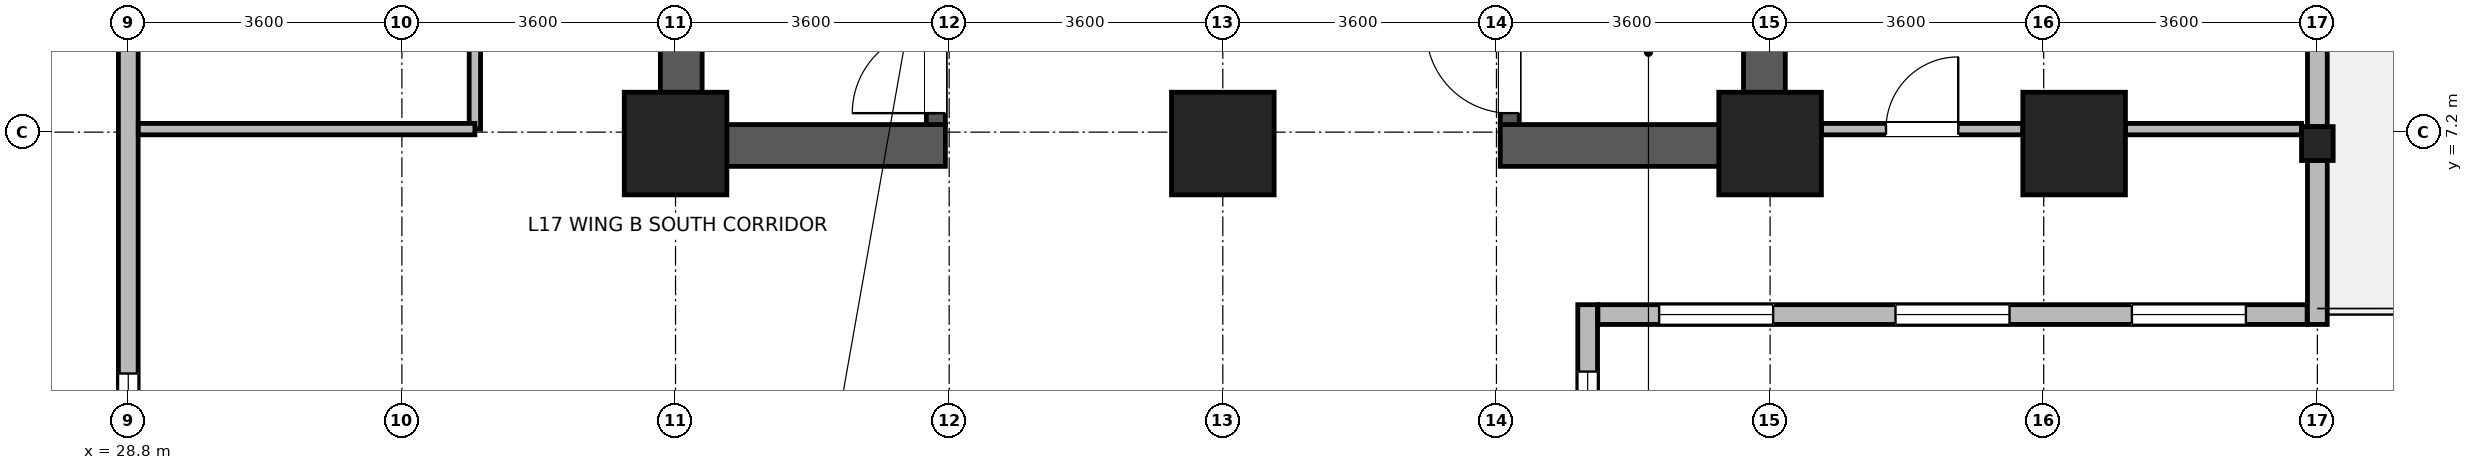
"""IFC4 building model, lengths in metres.
Left out: names, types, materials, properties, quantities, classifications, styles, units other than length and angle.
Written with IfcOpenShell. Run it as: python <this file> out.ifc"""

import sys

from ifc_helpers import new_model, si_unit, direction, frame, frame_2d, origin, origin_2d, place, context, subcontext, project, spatial, rectangle, i_section, extrude, source, transform, mapped, element, fill, save


model = new_model("IFC4")
c1 = context("Model", 3, precision=1e-05, world=origin(), true_north=direction((0.0, 1.0)))
c2 = subcontext(c1, "Body", "Model", "MODEL_VIEW")
j1 = project(units=[si_unit("LENGTHUNIT", "METRE"), si_unit("PLANEANGLEUNIT", "RADIAN")], contexts=[c1])
p1 = place(None, origin())
s1 = spatial("IfcSite", under=j1, at=p1, CompositionType="ELEMENT")
p2 = place(p1, origin())
s2 = spatial("IfcBuilding", under=s1, at=p2, CompositionType="ELEMENT")
p3 = place(p2, frame((0.0, 0.0, 69.7)))
s3 = spatial("IfcBuildingStorey", under=s2, at=p3, CompositionType="ELEMENT", Elevation=69.7)
for number, where, z_axis, x_axis in (
    (1, (36.075, 6.75, 0.0), (0.0, 0.0, 1.0), (0.0, 1.0, 0.0)),
    (2, (50.325, 6.75, 0.0), (0.0, 0.0, 1.0), (0.0, 1.0, 0.0)),
):
    element("IfcWall", number, at=place(p3, frame(where, z_axis=z_axis, x_axis=x_axis)), inside=s3, PredefinedType="SHEAR", context=c2, shape_type="SweptSolid", body=[
        extrude(rectangle(XDim=8.1, YDim=0.55, at=frame_2d((4.05, 0.0))), origin(), (0.0, 0.0, 1.0), 3.34),
    ])
for number, where, z_axis, x_axis in (
    (3, (36.35, 7.025, 0.0), (0.0, 0.0, 1.0), (1.0, 0.0, 0.0)),
    (4, (46.85, 7.025, 0.0), (0.0, 0.0, 1.0), (1.0, 0.0, 0.0)),
):
    element("IfcWall", number, at=place(p3, frame(where, z_axis=z_axis, x_axis=x_axis)), inside=s3, PredefinedType="SHEAR", context=c2, shape_type="SweptSolid", body=[
        extrude(rectangle(XDim=3.2, YDim=0.55, at=frame_2d((1.6, 0.0))), origin(), (0.0, 0.0, 1.0), 3.34),
    ])
p4 = place(p3, frame((39.425, 7.3, 0.0), z_axis=(0.0, 0.0, 1.0), x_axis=(0.0, 1.0, 0.0)))
e5 = element("IfcWall", 5, at=p4, inside=s3, PredefinedType="SHEAR", context=c2, shape_type="SweptSolid", body=[
    extrude(rectangle(XDim=7.0, YDim=0.25, at=frame_2d((3.5, 0.0))), origin(), (0.0, 0.0, 1.0), 3.34),
])
p5 = place(p4, frame((0.15, 0.0, 0.0)))
e6 = element("IfcOpeningElement", 6, at=p5, cuts=e5, PredefinedType="OPENING", context=c2, shape_type="SweptSolid", body=[
    extrude(rectangle(XDim=1.1, YDim=2.08, at=frame_2d((0.55, 1.04))), frame((0.0, 0.135, 0.0), z_axis=(0.0, -1.0, 0.0), x_axis=(1.0, 0.0, 0.0)), (0.0, 0.0, 1.0), 0.27),
])
p6 = place(p3, frame((46.975, 7.3, 0.0), z_axis=(0.0, 0.0, 1.0), x_axis=(0.0, 1.0, 0.0)))
e7 = element("IfcWall", 7, at=p6, inside=s3, PredefinedType="SHEAR", context=c2, shape_type="SweptSolid", body=[
    extrude(rectangle(XDim=7.0, YDim=0.25, at=frame_2d((3.5, 0.0))), origin(), (0.0, 0.0, 1.0), 3.34),
])
p7 = place(p6, frame((0.15, 0.0, 0.0)))
e8 = element("IfcOpeningElement", 8, at=p7, cuts=e7, PredefinedType="OPENING", context=c2, shape_type="SweptSolid", body=[
    extrude(rectangle(XDim=1.1, YDim=2.08, at=frame_2d((0.55, 1.04))), frame((0.0, 0.135, 0.0), z_axis=(0.0, -1.0, 0.0), x_axis=(1.0, 0.0, 0.0)), (0.0, 0.0, 1.0), 0.27),
])
m1 = source(origin(), c2, "Body", "SweptSolid", [
    extrude(rectangle(XDim=1.35, YDim=1.35, at=origin_2d()), origin(), (0.0, 0.0, 1.0), 3.7),
])
for number, where, z_axis, x_axis in (
    (9, (36.0, 7.05, 0.0), (0.0, 0.0, 1.0), (1.0, 0.0, 0.0)),
    (10, (43.2, 7.05, 0.0), (0.0, 0.0, 1.0), (1.0, 0.0, 0.0)),
    (11, (50.4, 7.05, 0.0), (0.0, 0.0, 1.0), (1.0, 0.0, 0.0)),
    (12, (54.4, 7.05, 0.0), (0.0, 0.0, 1.0), (1.0, 0.0, 0.0)),
):
    element("IfcColumn", number, at=place(p3, frame(where, z_axis=z_axis, x_axis=x_axis)), inside=s3, PredefinedType="COLUMN", context=c2, shape_type="MappedRepresentation", body=[
        mapped(m1, transform((0.0, 0.0, 0.0), x_axis=(1.0, 0.0, 0.0), y_axis=(0.0, 1.0, 0.0), z_axis=(0.0, 0.0, 1.0), scale=1.0)),
    ])
m2 = source(origin(), c2, "Body", "SweptSolid", [
    extrude(i_section(OverallWidth=0.416, OverallDepth=0.446, WebThickness=0.029, FlangeThickness=0.04, FilletRadius=0.015, at=origin_2d()), origin(), (0.0, 0.0, 1.0), 3.7),
])
p8 = place(p3, frame((57.6, 7.05, 0.0), z_axis=(0.0, 0.0, 1.0), x_axis=(1.0, 0.0, 0.0)))
e13 = element("IfcColumn", 13, at=p8, inside=s3, PredefinedType="COLUMN", context=c2, shape_type="MappedRepresentation", body=[
    mapped(m2, transform((0.0, 0.0, 0.0), x_axis=(1.0, 0.0, 0.0), y_axis=(0.0, 1.0, 0.0), z_axis=(0.0, 0.0, 1.0), scale=1.0)),
])
p9 = place(p3, frame((48.0, 4.93, 0.0), z_axis=(0.0, 0.0, 1.0), x_axis=(0.0, -1.0, 0.0)))
e14 = element("IfcWall", 14, at=p9, inside=s3, PredefinedType="STANDARD", context=c2, shape_type="SweptSolid", body=[
    extrude(rectangle(XDim=3.26, YDim=0.26, at=frame_2d((1.63, 0.0))), origin(), (0.0, 0.0, 1.0), 3.32),
])
p10 = place(p9, frame((0.88, 0.0, 0.85)))
e15 = element("IfcOpeningElement", 15, at=p10, cuts=e14, PredefinedType="OPENING", context=c2, shape_type="SweptSolid", body=[
    extrude(rectangle(XDim=1.5, YDim=1.85, at=frame_2d((0.75, 0.925))), frame((0.0, 0.14, 0.0), z_axis=(0.0, -1.0, 0.0), x_axis=(1.0, 0.0, 0.0)), (0.0, 0.0, 1.0), 0.28),
])
p11 = place(p3, frame((57.465, 4.8, 0.0), z_axis=(0.0, 0.0, 1.0), x_axis=(-1.0, 0.0, 0.0)))
e16 = element("IfcWall", 16, at=p11, inside=s3, PredefinedType="STANDARD", context=c2, shape_type="SweptSolid", body=[
    extrude(rectangle(XDim=9.33, YDim=0.26, at=frame_2d((4.665, 0.0))), origin(), (0.0, 0.0, 1.0), 3.32),
])
p12 = place(p11, frame((0.805, 0.0, 0.85)))
e17 = element("IfcOpeningElement", 17, at=p12, cuts=e16, PredefinedType="OPENING", context=c2, shape_type="SweptSolid", body=[
    extrude(rectangle(XDim=1.5, YDim=1.85, at=frame_2d((0.75, 0.925))), frame((0.0, 0.14, 0.0), z_axis=(0.0, -1.0, 0.0), x_axis=(1.0, 0.0, 0.0)), (0.0, 0.0, 1.0), 0.28),
])
p13 = place(p11, frame((3.915, 0.0, 0.85)))
e18 = element("IfcOpeningElement", 18, at=p13, cuts=e16, PredefinedType="OPENING", context=c2, shape_type="SweptSolid", body=[
    extrude(rectangle(XDim=1.5, YDim=1.85, at=frame_2d((0.75, 0.925))), frame((0.0, 0.14, 0.0), z_axis=(0.0, -1.0, 0.0), x_axis=(1.0, 0.0, 0.0)), (0.0, 0.0, 1.0), 0.28),
])
p14 = place(p11, frame((7.025, 0.0, 0.85)))
e19 = element("IfcOpeningElement", 19, at=p14, cuts=e16, PredefinedType="OPENING", context=c2, shape_type="SweptSolid", body=[
    extrude(rectangle(XDim=1.5, YDim=1.85, at=frame_2d((0.75, 0.925))), frame((0.0, 0.14, 0.0), z_axis=(0.0, -1.0, 0.0), x_axis=(1.0, 0.0, 0.0)), (0.0, 0.0, 1.0), 0.28),
])
p15 = place(p3, frame((57.6, 6.826, 0.0), z_axis=(0.0, 0.0, 1.0), x_axis=(0.0, -1.0, 0.0)))
e20 = element("IfcWall", 20, at=p15, inside=s3, PredefinedType="STANDARD", context=c2, shape_type="SweptSolid", body=[
    extrude(rectangle(XDim=2.156, YDim=0.26, at=frame_2d((1.078, 0.0))), origin(), (0.0, 0.0, 1.0), 3.32),
])
p16 = place(p3, frame((57.6, 14.326, 0.0), z_axis=(0.0, 0.0, 1.0), x_axis=(0.0, -1.0, 0.0)))
e21 = element("IfcWall", 21, at=p16, inside=s3, PredefinedType="STANDARD", context=c2, shape_type="SweptSolid", body=[
    extrude(rectangle(XDim=7.052, YDim=0.26, at=frame_2d((3.526, 0.0))), origin(), (0.0, 0.0, 1.0), 2.82),
])
p17 = place(p16, frame((2.776, 0.0, 0.0)))
e22 = element("IfcOpeningElement", 22, at=p17, cuts=e21, PredefinedType="OPENING", context=c2, shape_type="SweptSolid", body=[
    extrude(rectangle(XDim=1.5, YDim=2.15, at=frame_2d((0.75, 1.075))), frame((0.0, 0.14, 0.0), z_axis=(0.0, -1.0, 0.0), x_axis=(1.0, 0.0, 0.0)), (0.0, 0.0, 1.0), 0.28),
])
p18 = place(p16, frame((1.013, 0.0, 0.85)))
e23 = element("IfcOpeningElement", 23, at=p18, cuts=e21, PredefinedType="OPENING", context=c2, shape_type="SweptSolid", body=[
    extrude(rectangle(XDim=1.5, YDim=1.85, at=frame_2d((0.75, 0.925))), frame((0.0, 0.14, 0.0), z_axis=(0.0, -1.0, 0.0), x_axis=(1.0, 0.0, 0.0)), (0.0, 0.0, 1.0), 0.28),
])
p19 = place(p16, frame((4.539, 0.0, 0.85)))
e24 = element("IfcOpeningElement", 24, at=p19, cuts=e21, PredefinedType="OPENING", context=c2, shape_type="SweptSolid", body=[
    extrude(rectangle(XDim=1.5, YDim=1.85, at=frame_2d((0.75, 0.925))), frame((0.0, 0.14, 0.0), z_axis=(0.0, -1.0, 0.0), x_axis=(1.0, 0.0, 0.0)), (0.0, 0.0, 1.0), 0.28),
])
p20 = place(p3, frame((28.8, 1.67, 0.0), z_axis=(0.0, 0.0, 1.0), x_axis=(0.0, 1.0, 0.0)))
e25 = element("IfcWall", 25, at=p20, inside=s3, PredefinedType="STANDARD", context=c2, shape_type="SweptSolid", body=[
    extrude(rectangle(XDim=19.254, YDim=0.26, at=frame_2d((9.627, 0.0))), origin(), (0.0, 0.0, 1.0), 3.32),
])
p21 = place(p20, frame((0.854, 0.0, 0.85)))
e26 = element("IfcOpeningElement", 26, at=p21, cuts=e25, PredefinedType="OPENING", context=c2, shape_type="SweptSolid", body=[
    extrude(rectangle(XDim=1.5, YDim=1.85, at=frame_2d((0.75, 0.925))), frame((0.0, 0.14, 0.0), z_axis=(0.0, -1.0, 0.0), x_axis=(1.0, 0.0, 0.0)), (0.0, 0.0, 1.0), 0.28),
])
p22 = place(p20, frame((7.272, 0.0, 0.85)))
e27 = element("IfcOpeningElement", 27, at=p22, cuts=e25, PredefinedType="OPENING", context=c2, shape_type="SweptSolid", body=[
    extrude(rectangle(XDim=1.5, YDim=1.85, at=frame_2d((0.75, 0.925))), frame((0.0, 0.14, 0.0), z_axis=(0.0, -1.0, 0.0), x_axis=(1.0, 0.0, 0.0)), (0.0, 0.0, 1.0), 0.28),
])
p23 = place(p20, frame((10.481, 0.0, 0.85)))
e28 = element("IfcOpeningElement", 28, at=p23, cuts=e25, PredefinedType="OPENING", context=c2, shape_type="SweptSolid", body=[
    extrude(rectangle(XDim=1.5, YDim=1.85, at=frame_2d((0.75, 0.925))), frame((0.0, 0.14, 0.0), z_axis=(0.0, -1.0, 0.0), x_axis=(1.0, 0.0, 0.0)), (0.0, 0.0, 1.0), 0.28),
])
p24 = place(p20, frame((13.69, 0.0, 0.85)))
e29 = element("IfcOpeningElement", 29, at=p24, cuts=e25, PredefinedType="OPENING", context=c2, shape_type="SweptSolid", body=[
    extrude(rectangle(XDim=1.5, YDim=1.85, at=frame_2d((0.75, 0.925))), frame((0.0, 0.14, 0.0), z_axis=(0.0, -1.0, 0.0), x_axis=(1.0, 0.0, 0.0)), (0.0, 0.0, 1.0), 0.28),
])
p25 = place(p20, frame((16.899, 0.0, 0.85)))
e30 = element("IfcOpeningElement", 30, at=p25, cuts=e25, PredefinedType="OPENING", context=c2, shape_type="SweptSolid", body=[
    extrude(rectangle(XDim=1.5, YDim=1.85, at=frame_2d((0.75, 0.925))), frame((0.0, 0.14, 0.0), z_axis=(0.0, -1.0, 0.0), x_axis=(1.0, 0.0, 0.0)), (0.0, 0.0, 1.0), 0.28),
])
p26 = place(p3, frame((33.36, 7.24, 0.0), z_axis=(0.0, 0.0, 1.0), x_axis=(0.0, 1.0, 0.0)))
e31 = element("IfcWall", 31, at=p26, inside=s3, PredefinedType="PARTITIONING", context=c2, shape_type="SweptSolid", body=[
    extrude(rectangle(XDim=7.26, YDim=0.15, at=frame_2d((3.63, 0.0))), origin(), (0.0, 0.0, 1.0), 3.32),
])
p27 = place(p26, frame((2.98, 0.0, 0.0)))
e32 = element("IfcOpeningElement", 32, at=p27, cuts=e31, PredefinedType="OPENING", context=c2, shape_type="SweptSolid", body=[
    extrude(rectangle(XDim=1.3, YDim=2.12, at=frame_2d((0.65, 1.06))), frame((0.0, 0.085, 0.0), z_axis=(0.0, -1.0, 0.0), x_axis=(1.0, 0.0, 0.0)), (0.0, 0.0, 1.0), 0.17),
])
p28 = place(p3, frame((51.075, 7.24, 0.0), z_axis=(0.0, 0.0, 1.0), x_axis=(1.0, 0.0, 0.0)))
e33 = element("IfcWall", 33, at=p28, inside=s3, PredefinedType="PARTITIONING", context=c2, shape_type="SweptSolid", body=[
    extrude(rectangle(XDim=2.65, YDim=0.15, at=frame_2d((1.325, 0.0))), origin(), (0.0, 0.0, 1.0), 2.67),
])
p29 = place(p28, frame((0.85, 0.0, 0.0)))
e34 = element("IfcOpeningElement", 34, at=p29, cuts=e33, PredefinedType="OPENING", context=c2, shape_type="SweptSolid", body=[
    extrude(rectangle(XDim=0.95, YDim=2.1, at=frame_2d((0.475, 1.05))), frame((0.0, 0.085, 0.0), z_axis=(0.0, -1.0, 0.0), x_axis=(1.0, 0.0, 0.0)), (0.0, 0.0, 1.0), 0.17),
])
p30 = place(p3, frame((55.075, 7.24, 0.0), z_axis=(0.0, 0.0, 1.0), x_axis=(1.0, 0.0, 0.0)))
e35 = element("IfcWall", 35, at=p30, inside=s3, PredefinedType="PARTITIONING", context=c2, shape_type="SweptSolid", body=[
    extrude(rectangle(XDim=2.317, YDim=0.15, at=frame_2d((1.159, 0.0))), origin(), (0.0, 0.0, 1.0), 2.67),
])
p31 = place(p3, frame((28.932, 7.24, 0.0), z_axis=(0.0, 0.0, 1.0), x_axis=(1.0, 0.0, 0.0)))
e36 = element("IfcWall", 36, at=p31, inside=s3, PredefinedType="PARTITIONING", context=c2, shape_type="SweptSolid", body=[
    extrude(rectangle(XDim=4.428, YDim=0.15, at=frame_2d((2.214, 0.0))), origin(), (0.0, 0.0, 1.0), 3.32),
])
p32 = place(p10, origin())
e37 = element("IfcWindow", 37, at=p32, inside=s3, PartitioningType="SINGLE_PANEL", PredefinedType="WINDOW", context=c2, shape_type="SweptSolid", body=[
    extrude(rectangle(XDim=1.5, YDim=1.85, at=frame_2d((0.75, 0.925))), frame((0.0, 0.03, 0.0), z_axis=(0.0, -1.0, 0.0), x_axis=(1.0, 0.0, 0.0)), (0.0, 0.0, 1.0), 0.06),
])
fill(e15, e37)
p33 = place(p12, origin())
e38 = element("IfcWindow", 38, at=p33, inside=s3, PartitioningType="SINGLE_PANEL", PredefinedType="WINDOW", context=c2, shape_type="SweptSolid", body=[
    extrude(rectangle(XDim=1.5, YDim=1.85, at=frame_2d((0.75, 0.925))), frame((0.0, 0.03, 0.0), z_axis=(0.0, -1.0, 0.0), x_axis=(1.0, 0.0, 0.0)), (0.0, 0.0, 1.0), 0.06),
])
fill(e17, e38)
p34 = place(p13, origin())
e39 = element("IfcWindow", 39, at=p34, inside=s3, PartitioningType="SINGLE_PANEL", PredefinedType="WINDOW", context=c2, shape_type="SweptSolid", body=[
    extrude(rectangle(XDim=1.5, YDim=1.85, at=frame_2d((0.75, 0.925))), frame((0.0, 0.03, 0.0), z_axis=(0.0, -1.0, 0.0), x_axis=(1.0, 0.0, 0.0)), (0.0, 0.0, 1.0), 0.06),
])
fill(e18, e39)
p35 = place(p14, origin())
e40 = element("IfcWindow", 40, at=p35, inside=s3, PartitioningType="SINGLE_PANEL", PredefinedType="WINDOW", context=c2, shape_type="SweptSolid", body=[
    extrude(rectangle(XDim=1.5, YDim=1.85, at=frame_2d((0.75, 0.925))), frame((0.0, 0.03, 0.0), z_axis=(0.0, -1.0, 0.0), x_axis=(1.0, 0.0, 0.0)), (0.0, 0.0, 1.0), 0.06),
])
fill(e19, e40)
p36 = place(p21, origin())
e41 = element("IfcWindow", 41, at=p36, inside=s3, PartitioningType="SINGLE_PANEL", PredefinedType="WINDOW", context=c2, shape_type="SweptSolid", body=[
    extrude(rectangle(XDim=1.5, YDim=1.85, at=frame_2d((0.75, 0.925))), frame((0.0, 0.03, 0.0), z_axis=(0.0, -1.0, 0.0), x_axis=(1.0, 0.0, 0.0)), (0.0, 0.0, 1.0), 0.06),
])
fill(e26, e41)
p37 = place(p5, origin())
e42 = element("IfcDoor", 42, at=p37, inside=s3, OperationType="SINGLE_SWING_LEFT", PredefinedType="DOOR", context=c2, shape_type="SweptSolid", body=[
    extrude(rectangle(XDim=1.1, YDim=2.08, at=frame_2d((0.55, 1.04))), frame((0.0, 0.025, 0.0), z_axis=(0.0, -1.0, 0.0), x_axis=(1.0, 0.0, 0.0)), (0.0, 0.0, 1.0), 0.05),
])
fill(e6, e42)
p38 = place(p7, origin())
e43 = element("IfcDoor", 43, at=p38, inside=s3, OperationType="SINGLE_SWING_RIGHT", PredefinedType="DOOR", context=c2, shape_type="SweptSolid", body=[
    extrude(rectangle(XDim=1.1, YDim=2.08, at=frame_2d((0.55, 1.04))), frame((0.0, 0.025, 0.0), z_axis=(0.0, -1.0, 0.0), x_axis=(1.0, 0.0, 0.0)), (0.0, 0.0, 1.0), 0.05),
])
fill(e8, e43)
p39 = place(p29, origin())
e44 = element("IfcDoor", 44, at=p39, inside=s3, OperationType="SINGLE_SWING_RIGHT", PredefinedType="DOOR", context=c2, shape_type="SweptSolid", body=[
    extrude(rectangle(XDim=0.95, YDim=2.1, at=frame_2d((0.475, 1.05))), frame((0.0, 0.025, 0.0), z_axis=(0.0, -1.0, 0.0), x_axis=(1.0, 0.0, 0.0)), (0.0, 0.0, 1.0), 0.05),
])
fill(e34, e44)
save(model, sys.argv[1])
